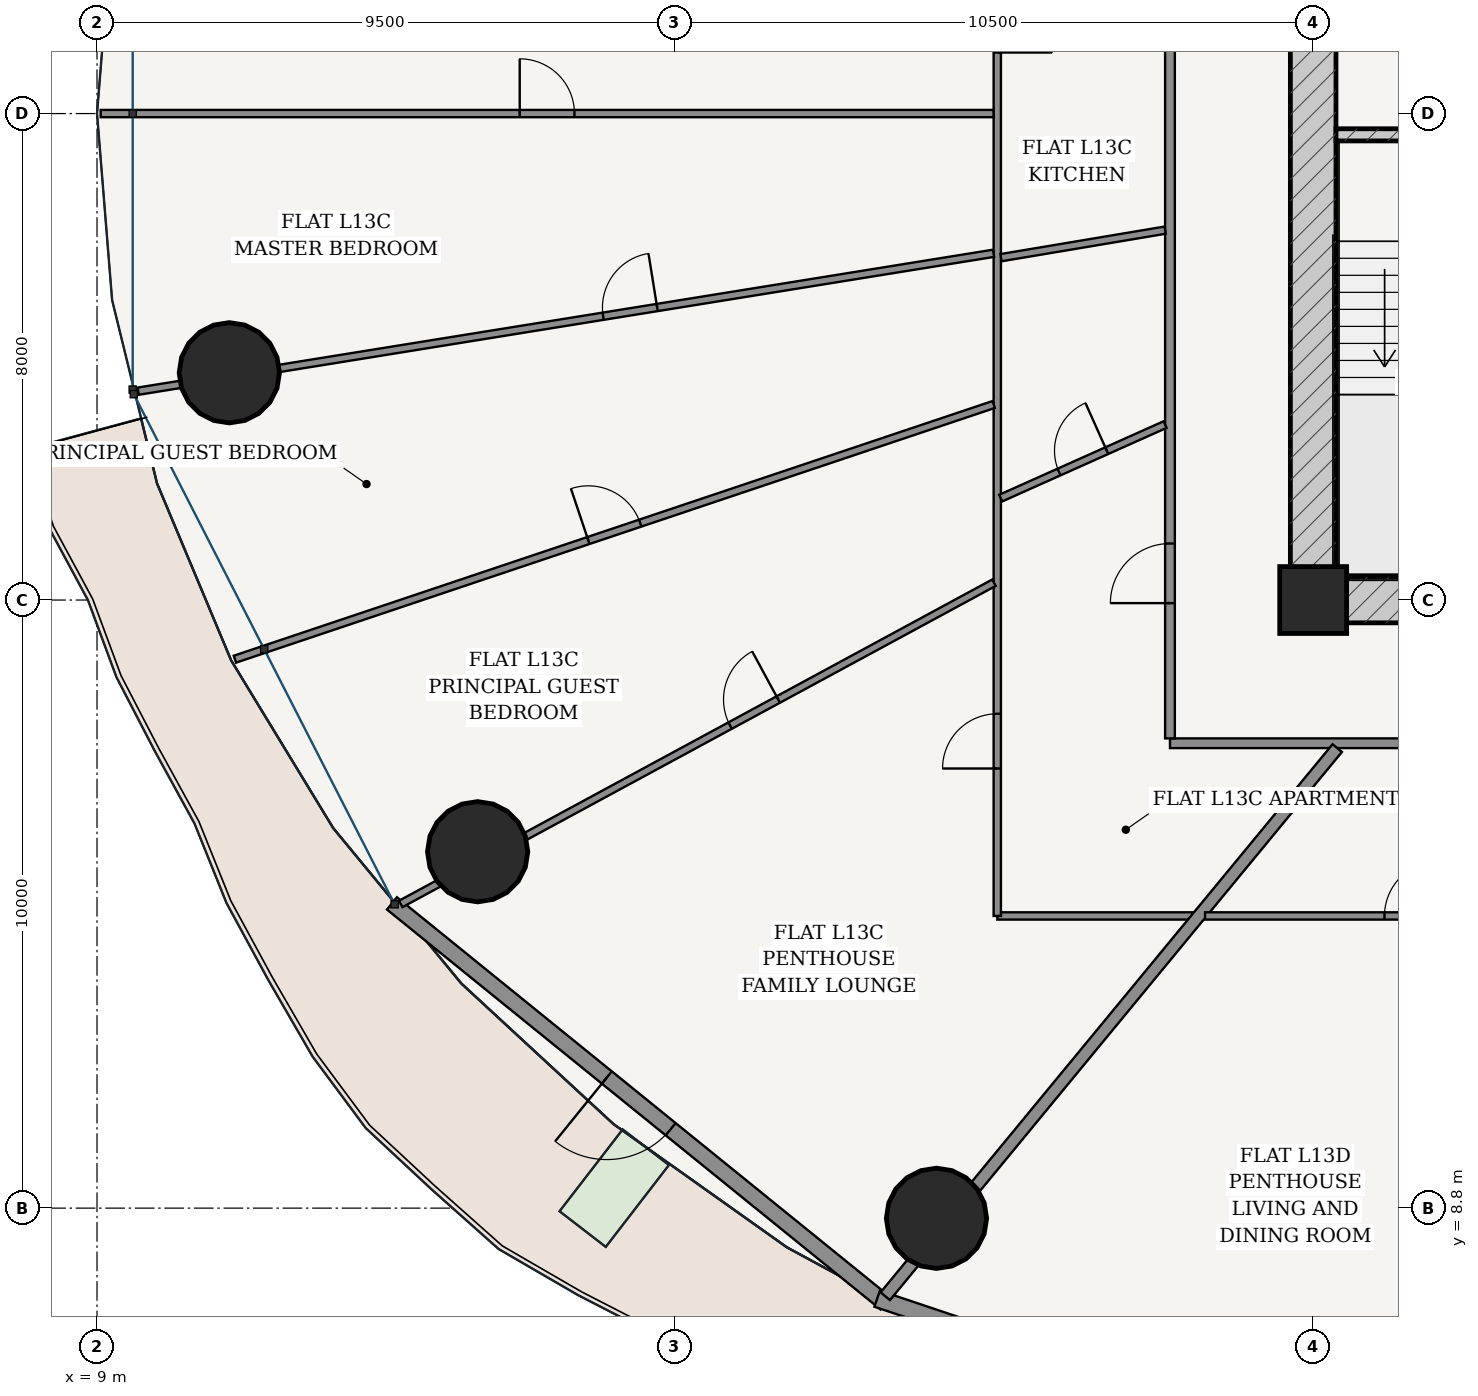
"""IFC4 building model, lengths in metres.
Left out: names, types, materials, properties, quantities, classifications, styles, units other than length and angle.
Written with IfcOpenShell. Run it as: python <this file> out.ifc"""

import sys

from ifc_helpers import new_model, si_unit, direction, frame, frame_2d, origin, origin_2d, place, context, subcontext, project, spatial, rectangle, hollow_circle, extrude, source, transform, mapped, element, fill, save


model = new_model("IFC4")
c1 = context("Model", 3, precision=1e-05, world=origin(), true_north=direction((-0.2419218956, 0.970295726276)))
c2 = subcontext(c1, "Body", "Model", "MODEL_VIEW")
j1 = project(units=[si_unit("LENGTHUNIT", "METRE"), si_unit("PLANEANGLEUNIT", "RADIAN")], contexts=[c1])
p1 = place(None, origin())
s1 = spatial("IfcSite", under=j1, at=p1, CompositionType="ELEMENT")
p2 = place(p1, origin())
s2 = spatial("IfcBuilding", under=s1, at=p2, CompositionType="ELEMENT")
p3 = place(p2, frame((0.0, 0.0, 52.8)))
s3 = spatial("IfcBuildingStorey", under=s2, at=p3, CompositionType="ELEMENT", Elevation=52.8)
p4 = place(p3, frame((29.0, 18.8, 0.0), z_axis=(0.0, 0.0, 1.0), x_axis=(1.0, 0.0, 0.0)))
e1 = element("IfcColumn", 1, at=p4, inside=s3, PredefinedType="COLUMN", context=c2, shape_type="SweptSolid", body=[
    extrude(rectangle(XDim=1.1, YDim=1.1, at=origin_2d()), origin(), (0.0, 0.0, 1.0), 3.6),
])
p5 = place(p3, frame((28.625, 18.8, 0.0), z_axis=(0.0, 0.0, 1.0), x_axis=(1.0, 0.0, 0.0)))
e2 = element("IfcWall", 2, at=p5, inside=s3, PredefinedType="SHEAR", context=c2, shape_type="SweptSolid", body=[
    extrude(rectangle(XDim=18.75, YDim=0.75, at=frame_2d((9.375, 0.0))), origin(), (0.0, 0.0, 1.0), 3.32),
])
p6 = place(p5, frame((7.627, 0.0, 0.0)))
e3 = element("IfcOpeningElement", 3, at=p6, cuts=e2, PredefinedType="OPENING", context=c2, shape_type="SweptSolid", body=[
    extrude(rectangle(XDim=0.85, YDim=2.1, at=frame_2d((0.425, 1.05))), frame((0.0, 0.385, 0.0), z_axis=(0.0, -1.0, 0.0), x_axis=(1.0, 0.0, 0.0)), (0.0, 0.0, 1.0), 0.77),
])
p7 = place(p5, frame((10.673, 0.0, 0.0)))
e4 = element("IfcOpeningElement", 4, at=p7, cuts=e2, PredefinedType="OPENING", context=c2, shape_type="SweptSolid", body=[
    extrude(rectangle(XDim=0.85, YDim=2.1, at=frame_2d((0.425, 1.05))), frame((0.0, 0.385, 0.0), z_axis=(0.0, -1.0, 0.0), x_axis=(1.0, 0.0, 0.0)), (0.0, 0.0, 1.0), 0.77),
])
p8 = place(p3, frame((29.0, 19.175, 0.0), z_axis=(0.0, 0.0, 1.0), x_axis=(0.0, 1.0, 0.0)))
e5 = element("IfcWall", 5, at=p8, inside=s3, PredefinedType="SHEAR", context=c2, shape_type="SweptSolid", body=[
    extrude(rectangle(XDim=15.25, YDim=0.75, at=frame_2d((7.625, 0.0))), origin(), (0.0, 0.0, 1.0), 3.32),
])
p9 = place(p8, frame((9.875, 0.0, 0.0)))
e6 = element("IfcOpeningElement", 6, at=p9, cuts=e5, PredefinedType="OPENING", context=c2, shape_type="SweptSolid", body=[
    extrude(rectangle(XDim=1.5, YDim=2.2, at=frame_2d((0.75, 1.1))), frame((0.0, 0.385, 0.0), z_axis=(0.0, -1.0, 0.0), x_axis=(1.0, 0.0, 0.0)), (0.0, 0.0, 1.0), 0.77),
])
p10 = place(p3, frame((29.375, 26.45, 0.0), z_axis=(0.0, 0.0, 1.0), x_axis=(1.0, 0.0, 0.0)))
e7 = element("IfcWall", 7, at=p10, inside=s3, PredefinedType="SOLIDWALL", context=c2, shape_type="SweptSolid", body=[
    extrude(rectangle(XDim=3.32, YDim=0.2, at=frame_2d((1.66, 0.0))), origin(), (0.0, 0.0, 1.0), 3.32),
])
p11 = place(p10, frame((1.185, 0.0, 0.0)))
e8 = element("IfcOpeningElement", 8, at=p11, cuts=e7, PredefinedType="OPENING", context=c2, shape_type="SweptSolid", body=[
    extrude(rectangle(XDim=0.95, YDim=2.15, at=frame_2d((0.475, 1.075))), frame((0.0, 0.11, 0.0), z_axis=(0.0, -1.0, 0.0), x_axis=(1.0, 0.0, 0.0)), (0.0, 0.0, 1.0), 0.22),
])
for number, where, z_axis, x_axis in (
    (9, (11.176, 22.537, 0.0), (0.0, 0.0, 1.0), (1.0, 0.0, 0.0)),
    (10, (15.259, 14.661, 0.0), (0.0, 0.0, 1.0), (1.0, 0.0, 0.0)),
    (11, (22.805, 8.632, 0.0), (0.0, 0.0, 1.0), (1.0, 0.0, 0.0)),
):
    element("IfcColumn", number, at=place(p3, frame(where, z_axis=z_axis, x_axis=x_axis)), inside=s3, PredefinedType="COLUMN", context=c2, shape_type="SweptSolid", body=[
        extrude(hollow_circle(Radius=0.825, WallThickness=0.05, at=origin_2d()), origin(), (0.0, 0.0, 1.0), 3.6),
    ])
p12 = place(p3, frame((13.85, 13.811, 0.0), z_axis=(0.0, 0.0, 1.0), x_axis=(0.777016782851, -0.629479879875, 0.0)))
e12 = element("IfcWall", 12, at=p12, inside=s3, PredefinedType="SOLIDWALL", context=c2, shape_type="SweptSolid", body=[
    extrude(rectangle(XDim=10.447, YDim=0.26, at=frame_2d((5.223, 0.0))), origin(), (0.0, 0.0, 1.0), 3.32),
])
p13 = place(p12, frame((4.548, 0.0, 0.0)))
e13 = element("IfcOpeningElement", 13, at=p13, cuts=e12, PredefinedType="OPENING", context=c2, shape_type="SweptSolid", body=[
    extrude(rectangle(XDim=1.35, YDim=2.2, at=frame_2d((0.675, 1.1))), frame((0.0, 0.14, 0.0), z_axis=(0.0, -1.0, 0.0), x_axis=(1.0, 0.0, 0.0)), (0.0, 0.0, 1.0), 0.28),
])
p14 = place(p3, frame((21.829, 7.311, 0.0), z_axis=(0.0, 0.0, 1.0), x_axis=(0.948047847546, -0.31812777113, 0.0)))
e14 = element("IfcWall", 14, at=p14, inside=s3, PredefinedType="SOLIDWALL", context=c2, shape_type="SweptSolid", body=[
    extrude(rectangle(XDim=11.175, YDim=0.28, at=frame_2d((5.588, 0.0))), origin(), (0.0, 0.0, 1.0), 3.32),
])
p15 = place(p14, frame((1.967, 0.0, 0.85)))
e15 = element("IfcOpeningElement", 15, at=p15, cuts=e14, PredefinedType="OPENING", context=c2, shape_type="SweptSolid", body=[
    extrude(rectangle(XDim=2.1, YDim=1.95, at=frame_2d((1.05, 0.975))), frame((0.0, 0.15, 0.0), z_axis=(0.0, -1.0, 0.0), x_axis=(1.0, 0.0, 0.0)), (0.0, 0.0, 1.0), 0.3),
])
p16 = place(p14, frame((7.108, 0.0, 0.85)))
e16 = element("IfcOpeningElement", 16, at=p16, cuts=e14, PredefinedType="OPENING", context=c2, shape_type="SweptSolid", body=[
    extrude(rectangle(XDim=2.1, YDim=1.95, at=frame_2d((1.05, 0.975))), frame((0.0, 0.15, 0.0), z_axis=(0.0, -1.0, 0.0), x_axis=(1.0, 0.0, 0.0)), (0.0, 0.0, 1.0), 0.3),
])
p17 = place(p3, frame((26.645, 16.445, 0.0), z_axis=(0.0, 0.0, 1.0), x_axis=(1.0, 0.0, 0.0)))
e17 = element("IfcWall", 17, at=p17, inside=s3, PredefinedType="PARTITIONING", context=c2, shape_type="SweptSolid", body=[
    extrude(rectangle(XDim=22.71, YDim=0.16, at=frame_2d((11.355, 0.0))), origin(), (0.0, 0.0, 1.0), 2.688),
])
p18 = place(p17, frame((19.962, 0.0, 0.0)))
e18 = element("IfcOpeningElement", 18, at=p18, cuts=e17, PredefinedType="OPENING", context=c2, shape_type="SweptSolid", body=[
    extrude(rectangle(XDim=0.98, YDim=2.2, at=frame_2d((0.49, 1.1))), frame((0.0, 0.09, 0.0), z_axis=(0.0, -1.0, 0.0), x_axis=(1.0, 0.0, 0.0)), (0.0, 0.0, 1.0), 0.18),
])
p19 = place(p3, frame((26.645, 16.525, 0.0), z_axis=(0.0, 0.0, 1.0), x_axis=(0.0, 1.0, 0.0)))
e19 = element("IfcWall", 19, at=p19, inside=s3, PredefinedType="PARTITIONING", context=c2, shape_type="SweptSolid", body=[
    extrude(rectangle(XDim=20.55, YDim=0.16, at=frame_2d((10.275, 0.0))), origin(), (0.0, 0.0, 1.0), 2.688),
])
p20 = place(p19, frame((2.224, 0.0, 0.0)))
e20 = element("IfcOpeningElement", 20, at=p20, cuts=e19, PredefinedType="OPENING", context=c2, shape_type="SweptSolid", body=[
    extrude(rectangle(XDim=0.98, YDim=2.2, at=frame_2d((0.49, 1.1))), frame((0.0, 0.09, 0.0), z_axis=(0.0, -1.0, 0.0), x_axis=(1.0, 0.0, 0.0)), (0.0, 0.0, 1.0), 0.18),
])
p21 = place(p3, frame((27.018, 13.605, 0.0), z_axis=(0.0, 0.0, 1.0), x_axis=(-1.0, 0.0, 0.0)))
e21 = element("IfcWall", 21, at=p21, inside=s3, PredefinedType="PARTITIONING", context=c2, shape_type="SweptSolid", body=[
    extrude(rectangle(XDim=3.213, YDim=0.12, at=frame_2d((1.606, 0.0))), origin(), (0.0, 0.0, 1.0), 2.688),
])
p22 = place(p3, frame((23.805, 13.605, 0.0), z_axis=(0.0, 0.0, 1.0), x_axis=(0.0, 1.0, 0.0)))
e22 = element("IfcWall", 22, at=p22, inside=s3, PredefinedType="PARTITIONING", context=c2, shape_type="SweptSolid", body=[
    extrude(rectangle(XDim=20.779, YDim=0.12, at=frame_2d((10.39, 0.0))), origin(), (0.0, 0.0, 1.0), 2.688),
])
p23 = place(p22, frame((2.425, 0.0, 0.0)))
e23 = element("IfcOpeningElement", 23, at=p23, cuts=e22, PredefinedType="OPENING", context=c2, shape_type="SweptSolid", body=[
    extrude(rectangle(XDim=0.9, YDim=2.15, at=frame_2d((0.45, 1.075))), frame((0.0, 0.07, 0.0), z_axis=(0.0, -1.0, 0.0), x_axis=(1.0, 0.0, 0.0)), (0.0, 0.0, 1.0), 0.14),
])
p24 = place(p22, frame((14.199, 0.0, 0.0)))
e24 = element("IfcOpeningElement", 24, at=p24, cuts=e22, PredefinedType="OPENING", context=c2, shape_type="SweptSolid", body=[
    extrude(rectangle(XDim=0.9, YDim=2.15, at=frame_2d((0.45, 1.075))), frame((0.0, 0.07, 0.0), z_axis=(0.0, -1.0, 0.0), x_axis=(1.0, 0.0, 0.0)), (0.0, 0.0, 1.0), 0.14),
])
p25 = place(p22, frame((17.908, 0.0, 0.0)))
e25 = element("IfcOpeningElement", 25, at=p25, cuts=e22, PredefinedType="OPENING", context=c2, shape_type="SweptSolid", body=[
    extrude(rectangle(XDim=0.9, YDim=2.15, at=frame_2d((0.45, 1.075))), frame((0.0, 0.07, 0.0), z_axis=(0.0, -1.0, 0.0), x_axis=(1.0, 0.0, 0.0)), (0.0, 0.0, 1.0), 0.14),
])
p26 = place(p3, frame((23.743, 26.8, 0.0), z_axis=(0.0, 0.0, 1.0), x_axis=(-1.0, 0.0, 0.0)))
e26 = element("IfcWall", 26, at=p26, inside=s3, PredefinedType="PARTITIONING", context=c2, shape_type="SweptSolid", body=[
    extrude(rectangle(XDim=14.683, YDim=0.12, at=frame_2d((7.341, 0.0))), origin(), (0.0, 0.0, 1.0), 2.762),
])
p27 = place(p26, frame((6.892, 0.0, 0.0)))
e27 = element("IfcOpeningElement", 27, at=p27, cuts=e26, PredefinedType="OPENING", context=c2, shape_type="SweptSolid", body=[
    extrude(rectangle(XDim=0.9, YDim=2.15, at=frame_2d((0.45, 1.075))), frame((0.0, 0.07, 0.0), z_axis=(0.0, -1.0, 0.0), x_axis=(1.0, 0.0, 0.0)), (0.0, 0.0, 1.0), 0.14),
])
p28 = place(p3, frame((23.744, 24.502, 0.0), z_axis=(0.0, 0.0, 1.0), x_axis=(-0.987259708938, -0.159117149007, 0.0)))
e28 = element("IfcWall", 28, at=p28, inside=s3, PredefinedType="PARTITIONING", context=c2, shape_type="SweptSolid", body=[
    extrude(rectangle(XDim=14.248, YDim=0.12, at=frame_2d((7.124, 0.0))), origin(), (0.0, 0.0, 1.0), 2.688),
])
p29 = place(p28, frame((5.603, 0.0, 0.0)))
e29 = element("IfcOpeningElement", 29, at=p29, cuts=e28, PredefinedType="OPENING", context=c2, shape_type="SweptSolid", body=[
    extrude(rectangle(XDim=0.9, YDim=2.15, at=frame_2d((0.45, 1.075))), frame((0.0, 0.07, 0.0), z_axis=(0.0, -1.0, 0.0), x_axis=(1.0, 0.0, 0.0)), (0.0, 0.0, 1.0), 0.14),
])
p30 = place(p3, frame((23.746, 22.016, 0.0), z_axis=(0.0, 0.0, 1.0), x_axis=(-0.948022802246, -0.318202398516, 0.0)))
e30 = element("IfcWall", 30, at=p30, inside=s3, PredefinedType="PARTITIONING", context=c2, shape_type="SweptSolid", body=[
    extrude(rectangle(XDim=13.163, YDim=0.12, at=frame_2d((6.582, 0.0))), origin(), (0.0, 0.0, 1.0), 2.762),
])
p31 = place(p30, frame((6.131, 0.0, 0.0)))
e31 = element("IfcOpeningElement", 31, at=p31, cuts=e30, PredefinedType="OPENING", context=c2, shape_type="SweptSolid", body=[
    extrude(rectangle(XDim=0.9, YDim=2.15, at=frame_2d((0.45, 1.075))), frame((0.0, 0.07, 0.0), z_axis=(0.0, -1.0, 0.0), x_axis=(1.0, 0.0, 0.0)), (0.0, 0.0, 1.0), 0.14),
])
p32 = place(p3, frame((23.75, 19.084, 0.0), z_axis=(0.0, 0.0, 1.0), x_axis=(-0.879370672984, -0.476137815654, 0.0)))
e32 = element("IfcWall", 32, at=p32, inside=s3, PredefinedType="PARTITIONING", context=c2, shape_type="SweptSolid", body=[
    extrude(rectangle(XDim=11.094, YDim=0.12, at=frame_2d((5.547, 0.0))), origin(), (0.0, 0.0, 1.0), 2.688),
])
p33 = place(p32, frame((4.034, 0.0, 0.0)))
e33 = element("IfcOpeningElement", 33, at=p33, cuts=e32, PredefinedType="OPENING", context=c2, shape_type="SweptSolid", body=[
    extrude(rectangle(XDim=0.9, YDim=2.15, at=frame_2d((0.45, 1.075))), frame((0.0, 0.07, 0.0), z_axis=(0.0, -1.0, 0.0), x_axis=(1.0, 0.0, 0.0)), (0.0, 0.0, 1.0), 0.14),
])
p34 = place(p3, frame((26.565, 24.883, 0.0), z_axis=(0.0, 0.0, 1.0), x_axis=(-0.986224611599, -0.165411654596, 0.0)))
e34 = element("IfcWall", 34, at=p34, inside=s3, PredefinedType="PARTITIONING", context=c2, shape_type="SweptSolid", body=[
    extrude(rectangle(XDim=2.736, YDim=0.12, at=frame_2d((1.368, 0.0))), origin(), (0.0, 0.0, 1.0), 2.688),
])
p35 = place(p3, frame((26.565, 21.685, 0.0), z_axis=(0.0, 0.0, 1.0), x_axis=(-0.912840085104, -0.408317252914, 0.0)))
e35 = element("IfcWall", 35, at=p35, inside=s3, PredefinedType="PARTITIONING", context=c2, shape_type="SweptSolid", body=[
    extrude(rectangle(XDim=2.961, YDim=0.12, at=frame_2d((1.481, 0.0))), origin(), (0.0, 0.0, 1.0), 3.32),
])
p36 = place(p35, frame((1.051, 0.0, 0.0)))
e36 = element("IfcOpeningElement", 36, at=p36, cuts=e35, PredefinedType="OPENING", context=c2, shape_type="SweptSolid", body=[
    extrude(rectangle(XDim=0.86, YDim=2.15, at=frame_2d((0.43, 1.075))), frame((0.0, 0.07, 0.0), z_axis=(0.0, -1.0, 0.0), x_axis=(1.0, 0.0, 0.0)), (0.0, 0.0, 1.0), 0.14),
])
p37 = place(p3, frame((29.396, 16.365, 0.0), z_axis=(0.0, 0.0, 1.0), x_axis=(-0.636186165667, -0.771535587393, 0.0)))
e37 = element("IfcWall", 37, at=p37, inside=s3, PredefinedType="PARTITIONING", context=c2, shape_type="SweptSolid", body=[
    extrude(rectangle(XDim=11.683, YDim=0.2, at=frame_2d((5.842, 0.0))), origin(), (0.0, 0.0, 1.0), 2.688),
])
p38 = place(p3, frame((52.195, 13.605, 0.0), z_axis=(0.0, 0.0, 1.0), x_axis=(-1.0, 0.0, 0.0)))
e38 = element("IfcWall", 38, at=p38, inside=s3, PredefinedType="PARTITIONING", context=c2, shape_type="SweptSolid", body=[
    extrude(rectangle(XDim=24.973, YDim=0.12, at=frame_2d((12.487, 0.0))), origin(), (0.0, 0.0, 1.0), 2.688),
])
p39 = place(p38, frame((3.841, 0.0, 0.0)))
e39 = element("IfcOpeningElement", 39, at=p39, cuts=e38, PredefinedType="OPENING", context=c2, shape_type="SweptSolid", body=[
    extrude(rectangle(XDim=0.9, YDim=2.15, at=frame_2d((0.45, 1.075))), frame((0.0, 0.07, 0.0), z_axis=(0.0, -1.0, 0.0), x_axis=(1.0, 0.0, 0.0)), (0.0, 0.0, 1.0), 0.14),
])
p40 = place(p38, frame((15.819, 0.0, 0.0)))
e40 = element("IfcOpeningElement", 40, at=p40, cuts=e38, PredefinedType="OPENING", context=c2, shape_type="SweptSolid", body=[
    extrude(rectangle(XDim=0.9, YDim=2.15, at=frame_2d((0.45, 1.075))), frame((0.0, 0.07, 0.0), z_axis=(0.0, -1.0, 0.0), x_axis=(1.0, 0.0, 0.0)), (0.0, 0.0, 1.0), 0.14),
])
p41 = place(p38, frame((21.123, 0.0, 0.0)))
e41 = element("IfcOpeningElement", 41, at=p41, cuts=e38, PredefinedType="OPENING", context=c2, shape_type="SweptSolid", body=[
    extrude(rectangle(XDim=0.9, YDim=2.15, at=frame_2d((0.45, 1.075))), frame((0.0, 0.07, 0.0), z_axis=(0.0, -1.0, 0.0), x_axis=(1.0, 0.0, 0.0)), (0.0, 0.0, 1.0), 0.14),
])
m1 = source(origin(), c2, "Body", "SweptSolid", [
    extrude(rectangle(XDim=1.35, YDim=2.2, at=frame_2d((0.675, 1.1))), frame((0.0, 0.025, 0.0), z_axis=(0.0, -1.0, 0.0), x_axis=(1.0, 0.0, 0.0)), (0.0, 0.0, 1.0), 0.05),
])
p42 = place(p13, frame((1.35, 0.0, 0.0), z_axis=(0.0, 0.0, 1.0), x_axis=(-1.0, 0.0, 0.0)))
e42 = element("IfcDoor", 42, at=p42, inside=s3, OperationType="SINGLE_SWING_RIGHT", PredefinedType="DOOR", context=c2, shape_type="MappedRepresentation", body=[
    mapped(m1, transform((0.0, 0.0, 0.0), scale=1.0)),
])
fill(e13, e42)
m2 = source(origin(), c2, "Body", "SweptSolid", [
    extrude(rectangle(XDim=0.98, YDim=2.2, at=frame_2d((0.49, 1.1))), frame((0.0, 0.025, 0.0), z_axis=(0.0, -1.0, 0.0), x_axis=(1.0, 0.0, 0.0)), (0.0, 0.0, 1.0), 0.05),
])
p43 = place(p20, origin())
e43 = element("IfcDoor", 43, at=p43, inside=s3, OperationType="SINGLE_SWING_LEFT", PredefinedType="DOOR", context=c2, shape_type="MappedRepresentation", body=[
    mapped(m2, transform((0.0, 0.0, 0.0), scale=1.0)),
])
fill(e20, e43)
m3 = source(origin(), c2, "Body", "SweptSolid", [
    extrude(rectangle(XDim=0.86, YDim=2.15, at=frame_2d((0.43, 1.075))), frame((0.0, 0.025, 0.0), z_axis=(0.0, -1.0, 0.0), x_axis=(1.0, 0.0, 0.0)), (0.0, 0.0, 1.0), 0.05),
])
p44 = place(p36, frame((0.86, 0.0, 0.0), z_axis=(0.0, 0.0, 1.0), x_axis=(-1.0, 0.0, 0.0)))
e44 = element("IfcDoor", 44, at=p44, inside=s3, OperationType="SINGLE_SWING_RIGHT", PredefinedType="DOOR", context=c2, shape_type="MappedRepresentation", body=[
    mapped(m3, transform((0.0, 0.0, 0.0), scale=1.0)),
])
fill(e36, e44)
m4 = source(origin(), c2, "Body", "SweptSolid", [
    extrude(rectangle(XDim=0.9, YDim=2.15, at=frame_2d((0.45, 1.075))), frame((0.0, 0.025, 0.0), z_axis=(0.0, -1.0, 0.0), x_axis=(1.0, 0.0, 0.0)), (0.0, 0.0, 1.0), 0.05),
])
p45 = place(p23, origin())
e45 = element("IfcDoor", 45, at=p45, inside=s3, OperationType="SINGLE_SWING_LEFT", PredefinedType="DOOR", context=c2, shape_type="MappedRepresentation", body=[
    mapped(m4, transform((0.0, 0.0, 0.0), scale=1.0)),
])
fill(e23, e45)
p46 = place(p33, frame((0.9, 0.0, 0.0), z_axis=(0.0, 0.0, 1.0), x_axis=(-1.0, 0.0, 0.0)))
e46 = element("IfcDoor", 46, at=p46, inside=s3, OperationType="SINGLE_SWING_RIGHT", PredefinedType="DOOR", context=c2, shape_type="MappedRepresentation", body=[
    mapped(m4, transform((0.0, 0.0, 0.0), scale=1.0)),
])
fill(e33, e46)
p47 = place(p31, frame((0.9, 0.0, 0.0), z_axis=(0.0, 0.0, 1.0), x_axis=(-1.0, 0.0, 0.0)))
e47 = element("IfcDoor", 47, at=p47, inside=s3, OperationType="SINGLE_SWING_LEFT", PredefinedType="DOOR", context=c2, shape_type="MappedRepresentation", body=[
    mapped(m4, transform((0.0, 0.0, 0.0), scale=1.0)),
])
fill(e31, e47)
p48 = place(p29, frame((0.9, 0.0, 0.0), z_axis=(0.0, 0.0, 1.0), x_axis=(-1.0, 0.0, 0.0)))
e48 = element("IfcDoor", 48, at=p48, inside=s3, OperationType="SINGLE_SWING_RIGHT", PredefinedType="DOOR", context=c2, shape_type="MappedRepresentation", body=[
    mapped(m4, transform((0.0, 0.0, 0.0), scale=1.0)),
])
fill(e29, e48)
p49 = place(p27, frame((0.9, 0.0, 0.0), z_axis=(0.0, 0.0, 1.0), x_axis=(-1.0, 0.0, 0.0)))
e49 = element("IfcDoor", 49, at=p49, inside=s3, OperationType="SINGLE_SWING_LEFT", PredefinedType="DOOR", context=c2, shape_type="MappedRepresentation", body=[
    mapped(m4, transform((0.0, 0.0, 0.0), scale=1.0)),
])
fill(e27, e49)
p50 = place(p41, frame((0.9, 0.0, 0.0), z_axis=(0.0, 0.0, 1.0), x_axis=(-1.0, 0.0, 0.0)))
e50 = element("IfcDoor", 50, at=p50, inside=s3, OperationType="SINGLE_SWING_RIGHT", PredefinedType="DOOR", context=c2, shape_type="MappedRepresentation", body=[
    mapped(m4, transform((0.0, 0.0, 0.0), scale=1.0)),
])
fill(e41, e50)
save(model, sys.argv[1])
